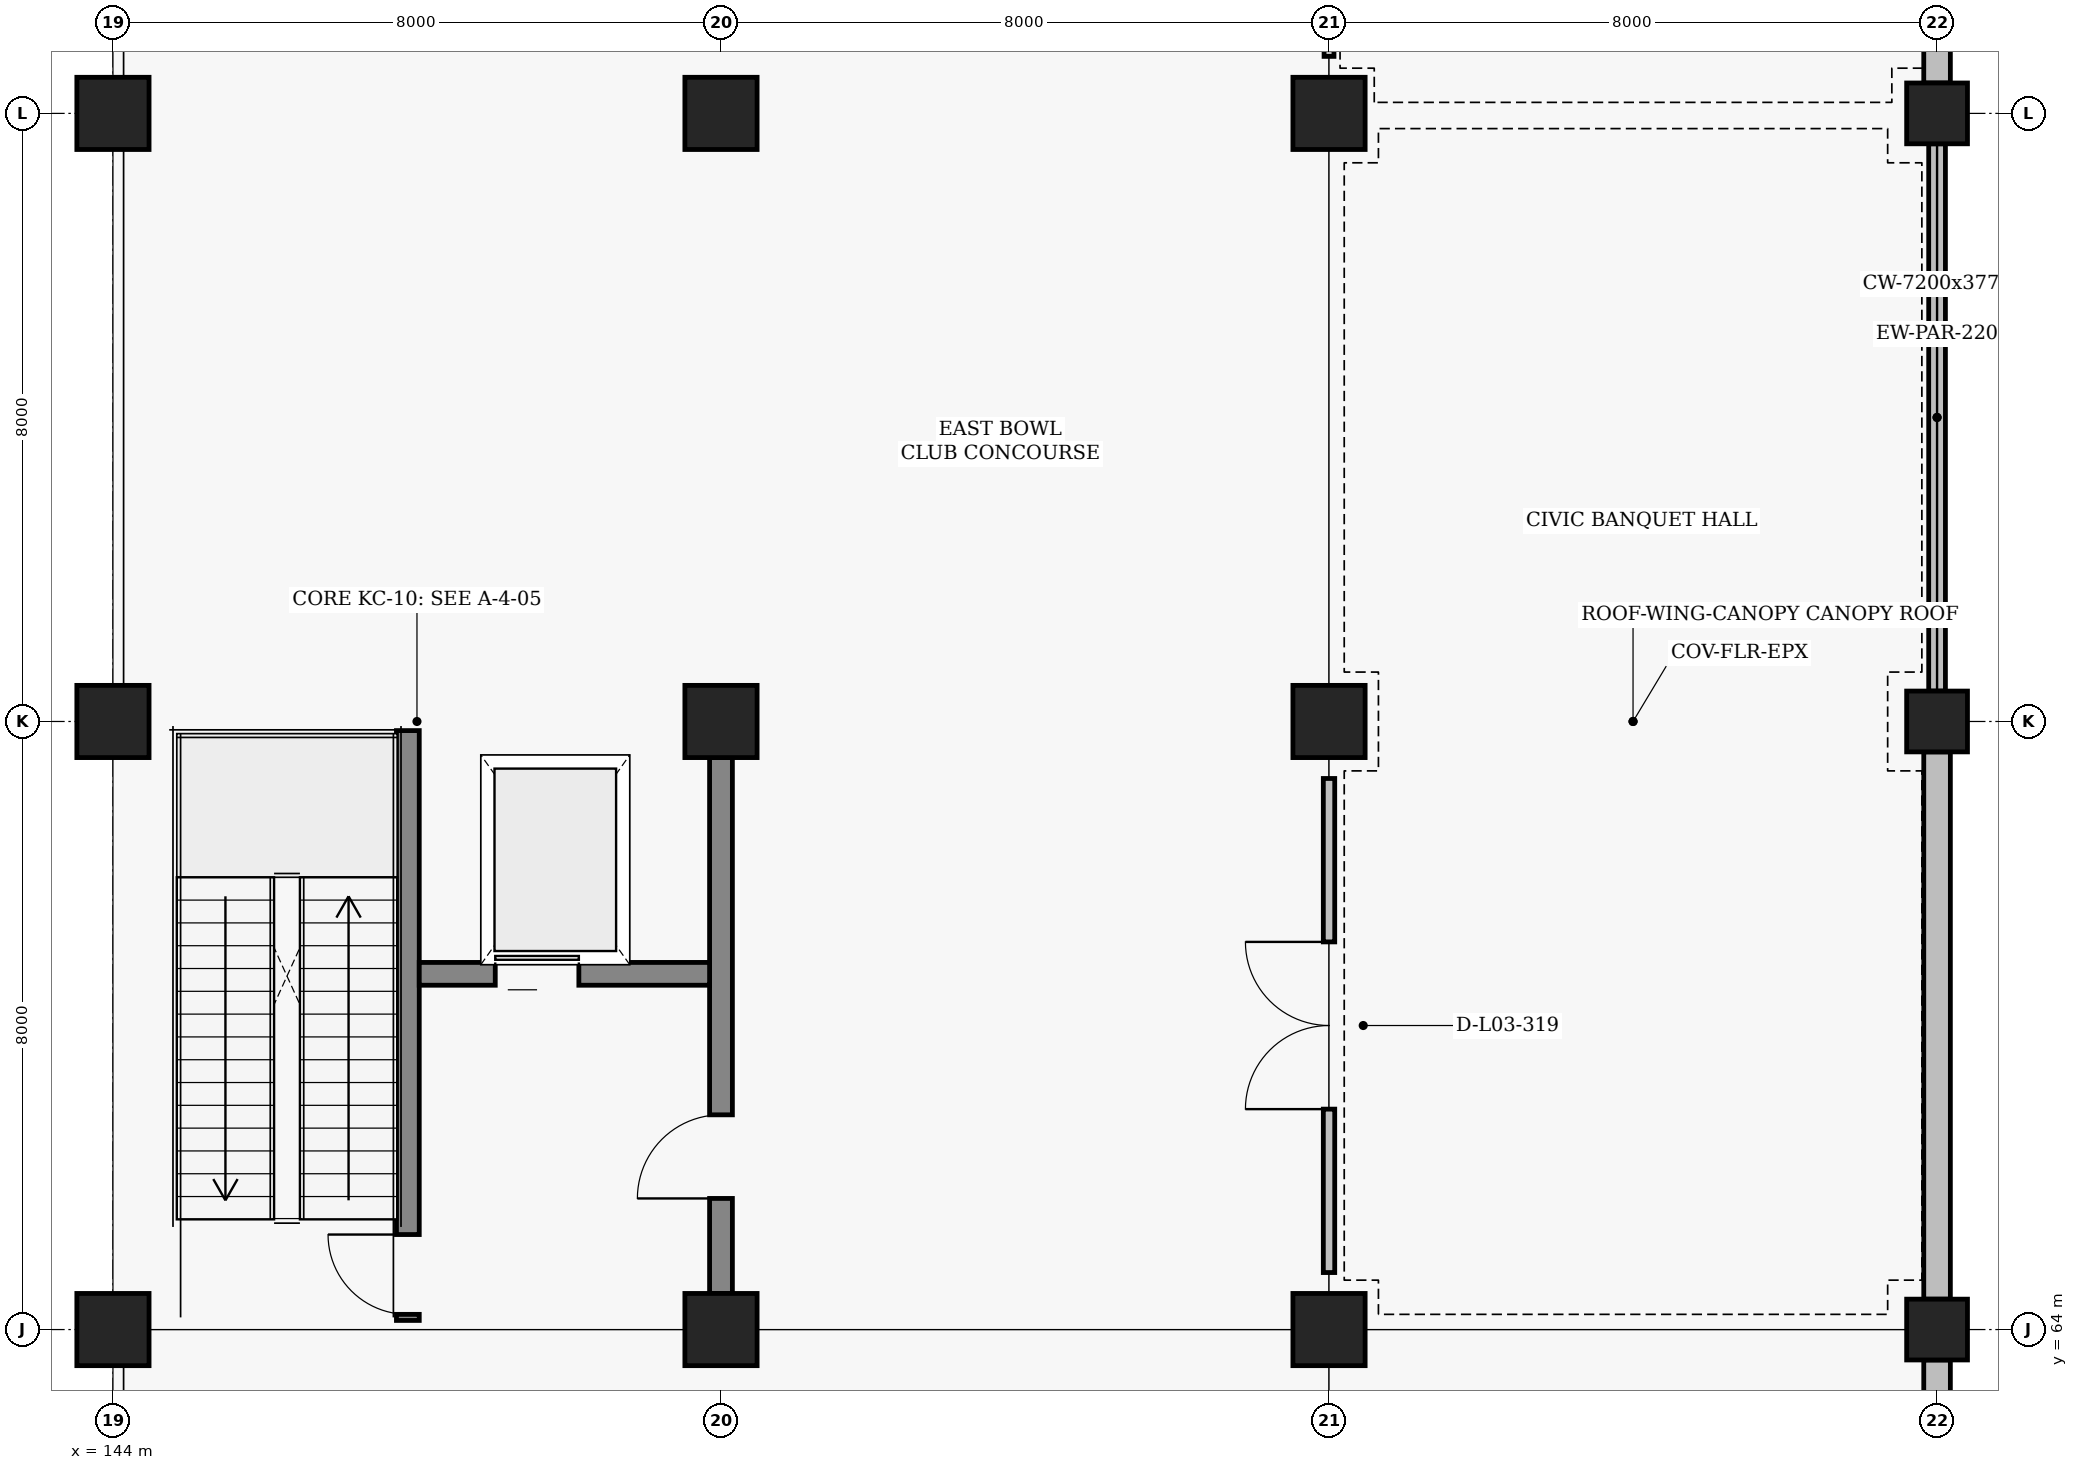
"""IFC4 building model, lengths in metres.
Left out: names, types, materials, properties, quantities, classifications, styles, units other than length and angle.
Written with IfcOpenShell. Run it as: python <this file> out.ifc"""

import sys

from ifc_helpers import new_model, si_unit, direction, frame, frame_2d, origin, origin_2d, place, context, subcontext, project, spatial, rectangle, extrude, element, fill, save


model = new_model("IFC4")
c1 = context("Model", 3, precision=1e-05, world=origin(), true_north=direction((0.0, 1.0)))
c2 = subcontext(c1, "Body", "Model", "MODEL_VIEW")
j1 = project(units=[si_unit("LENGTHUNIT", "METRE"), si_unit("PLANEANGLEUNIT", "RADIAN")], contexts=[c1])
p1 = place(None, origin())
s1 = spatial("IfcSite", under=j1, at=p1, CompositionType="ELEMENT")
p2 = place(p1, origin())
s2 = spatial("IfcBuilding", under=s1, at=p2, CompositionType="ELEMENT")
p3 = place(p2, frame((0.0, 0.0, 9.6)))
s3 = spatial("IfcBuildingStorey", under=s2, at=p3, CompositionType="ELEMENT", Elevation=9.6)
for number, where, z_axis, x_axis in (
    (1, (144.0, 64.0, 0.0), (0.0, 0.0, 1.0), (1.0, 0.0, 0.0)),
    (2, (144.0, 72.0, 0.0), (0.0, 0.0, 1.0), (1.0, 0.0, 0.0)),
    (3, (144.0, 80.0, 0.0), (0.0, 0.0, 1.0), (1.0, 0.0, 0.0)),
    (4, (152.0, 64.0, 0.0), (0.0, 0.0, 1.0), (1.0, 0.0, 0.0)),
    (5, (152.0, 72.0, 0.0), (0.0, 0.0, 1.0), (1.0, 0.0, 0.0)),
    (6, (152.0, 80.0, 0.0), (0.0, 0.0, 1.0), (1.0, 0.0, 0.0)),
    (7, (160.0, 64.0, 0.0), (0.0, 0.0, 1.0), (1.0, 0.0, 0.0)),
    (8, (160.0, 72.0, 0.0), (0.0, 0.0, 1.0), (1.0, 0.0, 0.0)),
    (9, (160.0, 80.0, 0.0), (0.0, 0.0, 1.0), (1.0, 0.0, 0.0)),
):
    element("IfcColumn", number, at=place(p3, frame(where, z_axis=z_axis, x_axis=x_axis)), inside=s3, PredefinedType="COLUMN", context=c2, shape_type="SweptSolid", body=[
        extrude(rectangle(XDim=0.95, YDim=0.95, at=origin_2d()), origin(), (0.0, 0.0, 1.0), 4.8),
    ])
for number, where, z_axis, x_axis in (
    (10, (168.0, 64.0, 0.0), (0.0, 0.0, 1.0), (1.0, 0.0, 0.0)),
    (11, (168.0, 72.0, 0.0), (0.0, 0.0, 1.0), (1.0, 0.0, 0.0)),
    (12, (168.0, 80.0, 0.0), (0.0, 0.0, 1.0), (1.0, 0.0, 0.0)),
):
    element("IfcColumn", number, at=place(p3, frame(where, z_axis=z_axis, x_axis=x_axis)), inside=s3, PredefinedType="COLUMN", context=c2, shape_type="SweptSolid", body=[
        extrude(rectangle(XDim=0.8, YDim=0.8, at=origin_2d()), origin(), (0.0, 0.0, 1.0), 4.8),
    ])
p4 = place(p3, frame((168.0, 56.4, 0.0), z_axis=(0.0, 0.0, 1.0), x_axis=(0.0, 1.0, 0.0)))
e13 = element("IfcWall", 13, at=p4, inside=s3, PredefinedType="SOLIDWALL", context=c2, shape_type="SweptSolid", body=[
    extrude(rectangle(XDim=7.2, YDim=0.35, at=frame_2d((3.6, 0.0))), origin(), (0.0, 0.0, 1.0), 3.93),
])
p5 = place(p4, frame((2.1, 0.0, 0.95)))
e14 = element("IfcOpeningElement", 14, at=p5, cuts=e13, PredefinedType="OPENING", context=c2, shape_type="SweptSolid", body=[
    extrude(rectangle(XDim=3.0, YDim=2.1, at=frame_2d((1.5, 1.05))), frame((0.0, 0.185, 0.0), z_axis=(0.0, -1.0, 0.0), x_axis=(1.0, 0.0, 0.0)), (0.0, 0.0, 1.0), 0.37),
])
p6 = place(p3, frame((168.0, 64.4, 0.0), z_axis=(0.0, 0.0, 1.0), x_axis=(0.0, 1.0, 0.0)))
e15 = element("IfcWall", 15, at=p6, inside=s3, PredefinedType="SOLIDWALL", context=c2, shape_type="SweptSolid", body=[
    extrude(rectangle(XDim=7.2, YDim=0.35, at=frame_2d((3.6, 0.0))), origin(), (0.0, 0.0, 1.0), 3.93),
])
p7 = place(p3, frame((168.0, 72.4, 0.0), z_axis=(0.0, 0.0, 1.0), x_axis=(0.0, 1.0, 0.0)))
e16 = element("IfcWall", 16, at=p7, inside=s3, PredefinedType="PARAPET", context=c2, shape_type="SweptSolid", body=[
    extrude(rectangle(XDim=7.2, YDim=0.22, at=frame_2d((3.6, 0.0))), origin(), (0.0, 0.0, 1.0), 0.16),
])
p8 = place(p3, frame((168.0, 80.4, 0.0), z_axis=(0.0, 0.0, 1.0), x_axis=(0.0, 1.0, 0.0)))
e17 = element("IfcWall", 17, at=p8, inside=s3, PredefinedType="SOLIDWALL", context=c2, shape_type="SweptSolid", body=[
    extrude(rectangle(XDim=7.2, YDim=0.35, at=frame_2d((3.6, 0.0))), origin(), (0.0, 0.0, 1.0), 3.93),
])
p9 = place(p3, frame((152.0, 64.475, 0.0), z_axis=(0.0, 0.0, 1.0), x_axis=(0.0, 1.0, 0.0)))
e18 = element("IfcWall", 18, at=p9, inside=s3, PredefinedType="SHEAR", context=c2, shape_type="SweptSolid", body=[
    extrude(rectangle(XDim=7.05, YDim=0.3, at=frame_2d((3.525, 0.0))), origin(), (0.0, 0.0, 1.0), 3.93),
])
p10 = place(p9, frame((1.25, 0.0, 0.0)))
e19 = element("IfcOpeningElement", 19, at=p10, cuts=e18, PredefinedType="OPENING", context=c2, shape_type="SweptSolid", body=[
    extrude(rectangle(XDim=1.1, YDim=2.2, at=frame_2d((0.55, 1.1))), frame((0.0, 0.16, 0.0), z_axis=(0.0, -1.0, 0.0), x_axis=(1.0, 0.0, 0.0)), (0.0, 0.0, 1.0), 0.32),
])
p11 = place(p3, frame((147.88, 64.12, 0.0), z_axis=(0.0, 0.0, 1.0), x_axis=(0.0, 1.0, 0.0)))
e20 = element("IfcWall", 20, at=p11, inside=s3, PredefinedType="SHEAR", context=c2, shape_type="SweptSolid", body=[
    extrude(rectangle(XDim=7.76, YDim=0.3, at=frame_2d((3.88, 0.0))), origin(), (0.0, 0.0, 1.0), 4.03),
])
p12 = place(p11, frame((0.08, 0.0, 0.0)))
e21 = element("IfcOpeningElement", 21, at=p12, cuts=e20, PredefinedType="OPENING", context=c2, shape_type="SweptSolid", body=[
    extrude(rectangle(XDim=1.05, YDim=2.15, at=frame_2d((0.525, 1.075))), frame((0.0, 0.16, 0.0), z_axis=(0.0, -1.0, 0.0), x_axis=(1.0, 0.0, 0.0)), (0.0, 0.0, 1.0), 0.32),
])
p13 = place(p3, frame((148.03, 68.68, 0.0), z_axis=(0.0, 0.0, 1.0), x_axis=(1.0, 0.0, 0.0)))
e22 = element("IfcWall", 22, at=p13, inside=s3, PredefinedType="SHEAR", context=c2, shape_type="SweptSolid", body=[
    extrude(rectangle(XDim=3.82, YDim=0.3, at=frame_2d((1.91, 0.0))), origin(), (0.0, 0.0, 1.0), 3.93),
])
p14 = place(p13, frame((1.0, 0.0, 0.0)))
e23 = element("IfcOpeningElement", 23, at=p14, cuts=e22, PredefinedType="OPENING", context=c2, shape_type="SweptSolid", body=[
    extrude(rectangle(XDim=1.1, YDim=2.15, at=frame_2d((0.55, 1.075))), frame((0.0, 0.16, 0.0), z_axis=(0.0, -1.0, 0.0), x_axis=(1.0, 0.0, 0.0)), (0.0, 0.0, 1.0), 0.32),
])
p15 = place(p3, frame((160.0, 64.75, 0.0), z_axis=(0.0, 0.0, 1.0), x_axis=(0.0, 1.0, 0.0)))
e24 = element("IfcWall", 24, at=p15, inside=s3, PredefinedType="PARTITIONING", context=c2, shape_type="SweptSolid", body=[
    extrude(rectangle(XDim=6.5, YDim=0.15, at=frame_2d((3.25, 0.0))), origin(), (0.0, 0.0, 1.0), 3.93),
])
p16 = place(p15, frame((2.15, 0.0, 0.0)))
e25 = element("IfcOpeningElement", 25, at=p16, cuts=e24, PredefinedType="OPENING", context=c2, shape_type="SweptSolid", body=[
    extrude(rectangle(XDim=2.2, YDim=2.4, at=frame_2d((1.1, 1.2))), frame((0.0, 0.085, 0.0), z_axis=(0.0, -1.0, 0.0), x_axis=(1.0, 0.0, 0.0)), (0.0, 0.0, 1.0), 0.17),
])
p17 = place(p3, frame((160.0, 80.75, 0.0), z_axis=(0.0, 0.0, 1.0), x_axis=(0.0, 1.0, 0.0)))
e26 = element("IfcWall", 26, at=p17, inside=s3, PredefinedType="PARTITIONING", context=c2, shape_type="SweptSolid", body=[
    extrude(rectangle(XDim=6.5, YDim=0.13, at=frame_2d((3.25, 0.0))), origin(), (0.0, 0.0, 1.0), 3.93),
])
p18 = place(p17, frame((2.75, 0.0, 0.0)))
e27 = element("IfcOpeningElement", 27, at=p18, cuts=e26, PredefinedType="OPENING", context=c2, shape_type="SweptSolid", body=[
    extrude(rectangle(XDim=1.0, YDim=2.1, at=frame_2d((0.5, 1.05))), frame((0.0, 0.075, 0.0), z_axis=(0.0, -1.0, 0.0), x_axis=(1.0, 0.0, 0.0)), (0.0, 0.0, 1.0), 0.15),
])
p19 = place(p10, origin())
e28 = element("IfcDoor", 28, at=p19, inside=s3, OperationType="SINGLE_SWING_LEFT", PredefinedType="DOOR", context=c2, shape_type="SweptSolid", body=[
    extrude(rectangle(XDim=1.1, YDim=2.2, at=frame_2d((0.55, 1.1))), frame((0.0, 0.025, 0.0), z_axis=(0.0, -1.0, 0.0), x_axis=(1.0, 0.0, 0.0)), (0.0, 0.0, 1.0), 0.05),
])
fill(e19, e28)
p20 = place(p12, origin())
e29 = element("IfcDoor", 29, at=p20, inside=s3, OperationType="SINGLE_SWING_RIGHT", PredefinedType="DOOR", context=c2, shape_type="SweptSolid", body=[
    extrude(rectangle(XDim=1.05, YDim=2.15, at=frame_2d((0.525, 1.075))), frame((0.0, 0.025, 0.0), z_axis=(0.0, -1.0, 0.0), x_axis=(1.0, 0.0, 0.0)), (0.0, 0.0, 1.0), 0.05),
])
fill(e21, e29)
p21 = place(p14, origin())
e30 = element("IfcDoor", 30, at=p21, inside=s3, OperationType="SLIDING_TO_LEFT", PredefinedType="DOOR", context=c2, shape_type="SweptSolid", body=[
    extrude(rectangle(XDim=1.1, YDim=2.15, at=frame_2d((0.55, 1.075))), frame((0.0, 0.025, 0.0), z_axis=(0.0, -1.0, 0.0), x_axis=(1.0, 0.0, 0.0)), (0.0, 0.0, 1.0), 0.05),
])
fill(e23, e30)
p22 = place(p16, origin())
e31 = element("IfcDoor", 31, at=p22, inside=s3, OperationType="DOUBLE_SWING_LEFT", PredefinedType="DOOR", context=c2, shape_type="SweptSolid", body=[
    extrude(rectangle(XDim=2.2, YDim=2.4, at=frame_2d((1.1, 1.2))), frame((0.0, 0.025, 0.0), z_axis=(0.0, -1.0, 0.0), x_axis=(1.0, 0.0, 0.0)), (0.0, 0.0, 1.0), 0.05),
])
fill(e25, e31)
save(model, sys.argv[1])
